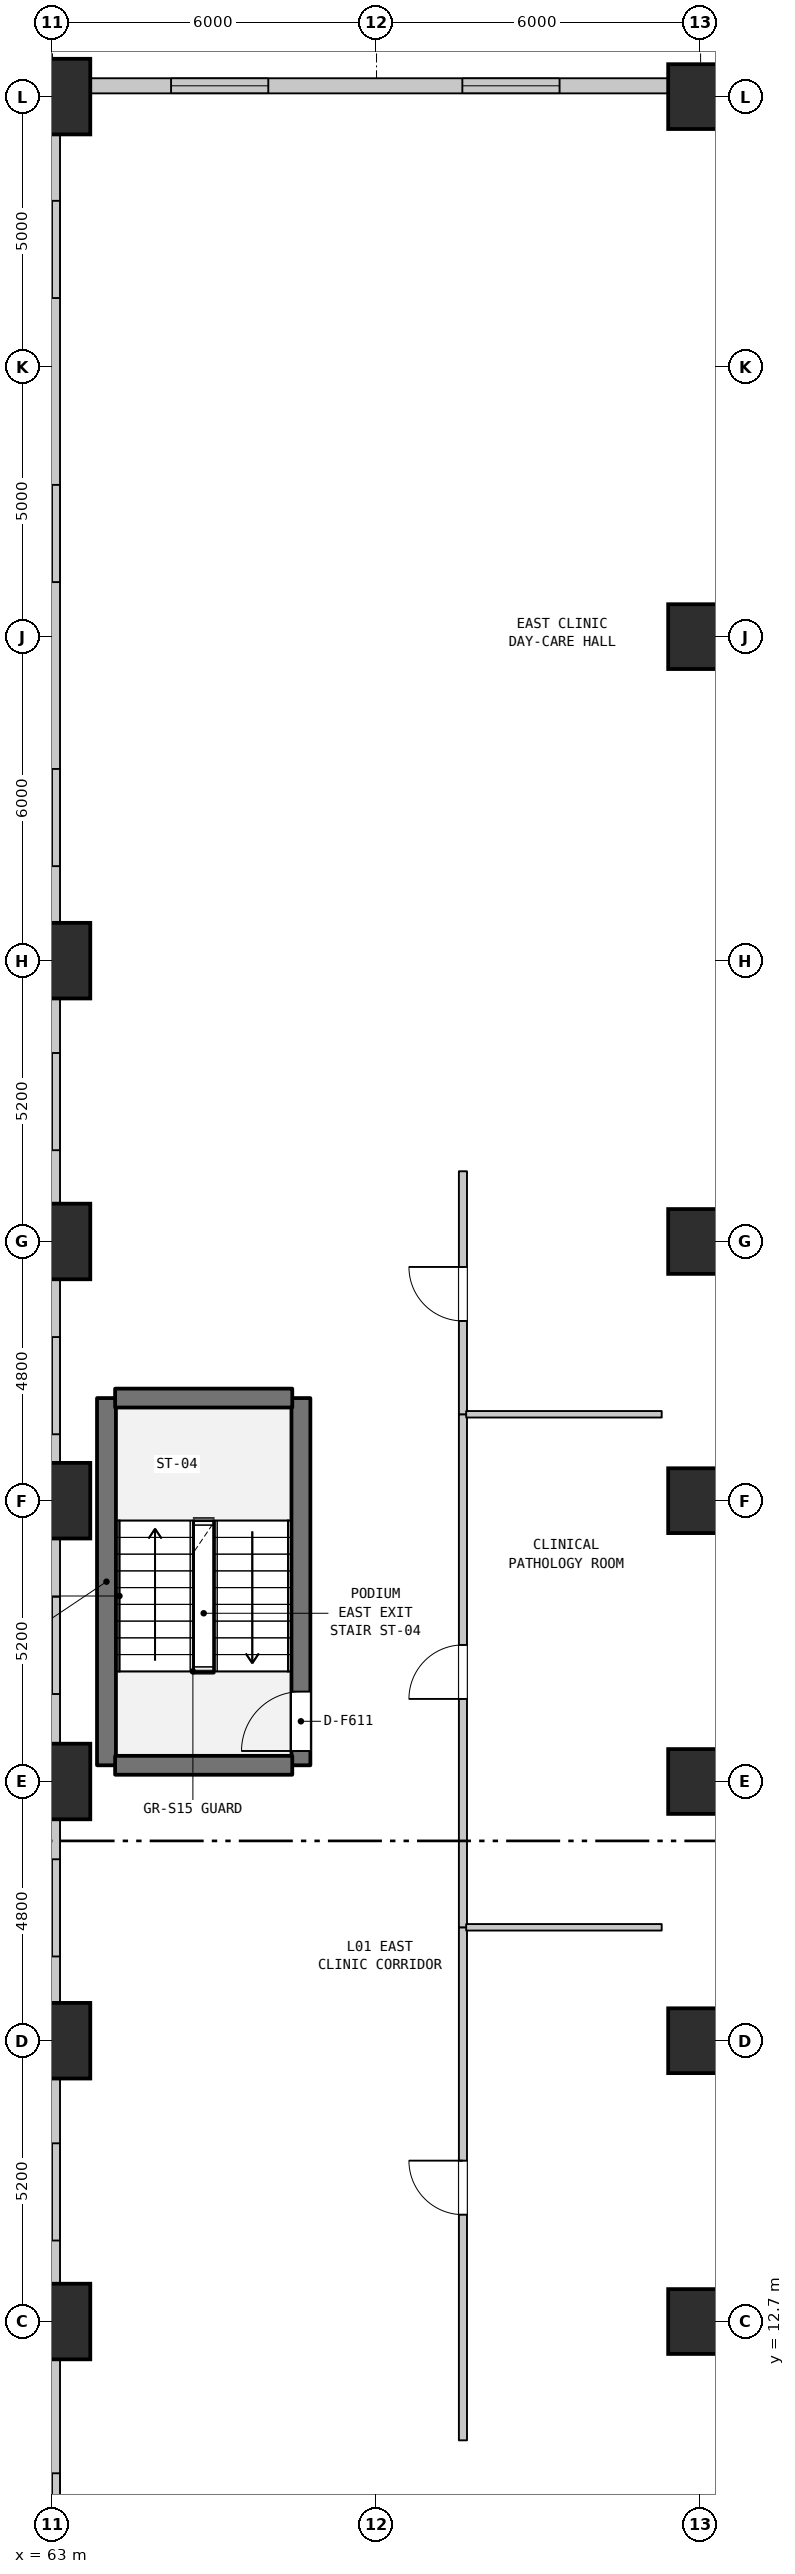
"""IFC4 building model, lengths in metres.
Left out: names, types, materials, properties, quantities, classifications, styles, units other than length and angle.
Written with IfcOpenShell. Run it as: python <this file> out.ifc"""

import sys

from ifc_helpers import new_model, si_unit, direction, frame, frame_2d, origin, origin_2d, place, context, subcontext, project, spatial, rectangle, extrude, element, fill, save


model = new_model("IFC4")
c1 = context("Model", 3, precision=1e-05, world=origin(), true_north=direction((0.0, 1.0)))
c2 = subcontext(c1, "Body", "Model", "MODEL_VIEW")
j1 = project(units=[si_unit("LENGTHUNIT", "METRE"), si_unit("PLANEANGLEUNIT", "RADIAN")], contexts=[c1])
p1 = place(None, origin())
s1 = spatial("IfcSite", under=j1, at=p1, CompositionType="ELEMENT")
p2 = place(p1, origin())
s2 = spatial("IfcBuilding", under=s1, at=p2, CompositionType="ELEMENT")
p3 = place(p2, frame((0.0, 0.0, 6.5)))
s3 = spatial("IfcBuildingStorey", under=s2, at=p3, CompositionType="ELEMENT", Elevation=6.5)
for number, where, z_axis, x_axis in (
    (1, (63.0, 12.7, 0.0), (0.0, 0.0, 1.0), (1.0, 0.0, 0.0)),
    (2, (63.0, 17.9, 0.0), (0.0, 0.0, 1.0), (1.0, 0.0, 0.0)),
    (3, (63.0, 22.7, 0.0), (0.0, 0.0, 1.0), (1.0, 0.0, 0.0)),
    (4, (63.0, 27.9, 0.0), (0.0, 0.0, 1.0), (1.0, 0.0, 0.0)),
    (5, (63.0, 32.7, 0.0), (0.0, 0.0, 1.0), (1.0, 0.0, 0.0)),
    (6, (63.0, 37.9, 0.0), (0.0, 0.0, 1.0), (1.0, 0.0, 0.0)),
    (7, (63.0, 53.9, 0.0), (0.0, 0.0, 1.0), (1.0, 0.0, 0.0)),
):
    element("IfcColumn", number, at=place(p3, frame(where, z_axis=z_axis, x_axis=x_axis)), inside=s3, PredefinedType="PILASTER", context=c2, shape_type="SweptSolid", body=[
        extrude(rectangle(XDim=1.4, YDim=1.4, at=origin_2d()), origin(), (0.0, 0.0, 1.0), 6.5),
    ])
for number, where, z_axis, x_axis in (
    (8, (75.0, 12.7, 0.0), (0.0, 0.0, 1.0), (1.0, 0.0, 0.0)),
    (9, (75.0, 17.9, 0.0), (0.0, 0.0, 1.0), (1.0, 0.0, 0.0)),
    (10, (75.0, 22.7, 0.0), (0.0, 0.0, 1.0), (1.0, 0.0, 0.0)),
    (11, (75.0, 27.9, 0.0), (0.0, 0.0, 1.0), (1.0, 0.0, 0.0)),
    (12, (75.0, 32.7, 0.0), (0.0, 0.0, 1.0), (1.0, 0.0, 0.0)),
    (13, (75.0, 43.9, 0.0), (0.0, 0.0, 1.0), (1.0, 0.0, 0.0)),
    (14, (75.0, 53.9, 0.0), (0.0, 0.0, 1.0), (1.0, 0.0, 0.0)),
):
    element("IfcColumn", number, at=place(p3, frame(where, z_axis=z_axis, x_axis=x_axis)), inside=s3, PredefinedType="PILASTER", context=c2, shape_type="SweptSolid", body=[
        extrude(rectangle(XDim=1.2, YDim=1.2, at=origin_2d()), origin(), (0.0, 0.0, 1.0), 6.5),
    ])
p4 = place(p3, frame((74.586, 54.1, 0.0), z_axis=(0.0, 0.0, 1.0), x_axis=(0.923717339373, -0.383074766777, 0.0)))
e15 = element("IfcWall", 15, at=p4, inside=s3, PredefinedType="STANDARD", context=c2, shape_type="SweptSolid", body=[
    extrude(rectangle(XDim=0.765, YDim=0.28, at=frame_2d((0.383, 0.0))), origin(), (0.0, 0.0, 1.0), 6.17),
])
p5 = place(p3, frame((75.293, 53.807, 0.0), z_axis=(0.0, 0.0, 1.0), x_axis=(0.707167825498, -0.707045731605, 0.0)))
e16 = element("IfcWall", 16, at=p5, inside=s3, PredefinedType="STANDARD", context=c2, shape_type="SweptSolid", body=[
    extrude(rectangle(XDim=2.0, YDim=0.28, at=frame_2d((1.0, 0.0))), origin(), (0.0, 0.0, 1.0), 6.17),
])
p6 = place(p3, frame((63.0, 0.7, 0.0), z_axis=(0.0, 0.0, 1.0), x_axis=(0.0, 1.0, 0.0)))
e17 = element("IfcWall", 17, at=p6, inside=s3, PredefinedType="STANDARD", context=c2, shape_type="SweptSolid", body=[
    extrude(rectangle(XDim=32.0, YDim=0.28, at=frame_2d((16.0, 0.0))), origin(), (0.0, 0.0, 1.0), 5.67),
])
p7 = place(p6, frame((2.13, 0.0, 0.95)))
e18 = element("IfcOpeningElement", 18, at=p7, cuts=e17, PredefinedType="OPENING", context=c2, shape_type="SweptSolid", body=[
    extrude(rectangle(XDim=1.8, YDim=1.8, at=frame_2d((0.9, 0.9))), frame((0.0, 0.15, 0.0), z_axis=(0.0, -1.0, 0.0), x_axis=(1.0, 0.0, 0.0)), (0.0, 0.0, 1.0), 0.3),
])
p8 = place(p6, frame((7.39, 0.0, 0.95)))
e19 = element("IfcOpeningElement", 19, at=p8, cuts=e17, PredefinedType="OPENING", context=c2, shape_type="SweptSolid", body=[
    extrude(rectangle(XDim=1.8, YDim=1.8, at=frame_2d((0.9, 0.9))), frame((0.0, 0.15, 0.0), z_axis=(0.0, -1.0, 0.0), x_axis=(1.0, 0.0, 0.0)), (0.0, 0.0, 1.0), 0.3),
])
p9 = place(p6, frame((13.5, 0.0, 0.95)))
e20 = element("IfcOpeningElement", 20, at=p9, cuts=e17, PredefinedType="OPENING", context=c2, shape_type="SweptSolid", body=[
    extrude(rectangle(XDim=1.8, YDim=1.8, at=frame_2d((0.9, 0.9))), frame((0.0, 0.15, 0.0), z_axis=(0.0, -1.0, 0.0), x_axis=(1.0, 0.0, 0.0)), (0.0, 0.0, 1.0), 0.3),
])
p10 = place(p6, frame((18.76, 0.0, 0.95)))
e21 = element("IfcOpeningElement", 21, at=p10, cuts=e17, PredefinedType="OPENING", context=c2, shape_type="SweptSolid", body=[
    extrude(rectangle(XDim=1.8, YDim=1.8, at=frame_2d((0.9, 0.9))), frame((0.0, 0.15, 0.0), z_axis=(0.0, -1.0, 0.0), x_axis=(1.0, 0.0, 0.0)), (0.0, 0.0, 1.0), 0.3),
])
p11 = place(p6, frame((23.62, 0.0, 0.95)))
e22 = element("IfcOpeningElement", 22, at=p11, cuts=e17, PredefinedType="OPENING", context=c2, shape_type="SweptSolid", body=[
    extrude(rectangle(XDim=1.8, YDim=1.8, at=frame_2d((0.9, 0.9))), frame((0.0, 0.15, 0.0), z_axis=(0.0, -1.0, 0.0), x_axis=(1.0, 0.0, 0.0)), (0.0, 0.0, 1.0), 0.3),
])
p12 = place(p6, frame((28.43, 0.0, 0.95)))
e23 = element("IfcOpeningElement", 23, at=p12, cuts=e17, PredefinedType="OPENING", context=c2, shape_type="SweptSolid", body=[
    extrude(rectangle(XDim=1.8, YDim=1.8, at=frame_2d((0.9, 0.9))), frame((0.0, 0.15, 0.0), z_axis=(0.0, -1.0, 0.0), x_axis=(1.0, 0.0, 0.0)), (0.0, 0.0, 1.0), 0.3),
])
p13 = place(p3, frame((63.0, 54.1, 0.0), z_axis=(0.0, 0.0, 1.0), x_axis=(1.0, 0.0, 0.0)))
e24 = element("IfcWall", 24, at=p13, inside=s3, PredefinedType="STANDARD", context=c2, shape_type="SweptSolid", body=[
    extrude(rectangle(XDim=11.586, YDim=0.28, at=frame_2d((5.793, 0.0))), origin(), (0.0, 0.0, 1.0), 6.17),
])
p14 = place(p13, frame((2.196, 0.0, 0.95)))
e25 = element("IfcOpeningElement", 25, at=p14, cuts=e24, PredefinedType="OPENING", context=c2, shape_type="SweptSolid", body=[
    extrude(rectangle(XDim=1.8, YDim=1.8, at=frame_2d((0.9, 0.9))), frame((0.0, 0.15, 0.0), z_axis=(0.0, -1.0, 0.0), x_axis=(1.0, 0.0, 0.0)), (0.0, 0.0, 1.0), 0.3),
])
p15 = place(p13, frame((7.589, 0.0, 0.95)))
e26 = element("IfcOpeningElement", 26, at=p15, cuts=e24, PredefinedType="OPENING", context=c2, shape_type="SweptSolid", body=[
    extrude(rectangle(XDim=1.8, YDim=1.8, at=frame_2d((0.9, 0.9))), frame((0.0, 0.15, 0.0), z_axis=(0.0, -1.0, 0.0), x_axis=(1.0, 0.0, 0.0)), (0.0, 0.0, 1.0), 0.3),
])
p16 = place(p3, frame((64.0, 23.0, 0.0), z_axis=(0.0, 0.0, 1.0), x_axis=(0.0, 1.0, 0.0)))
e27 = element("IfcWall", 27, at=p16, inside=s3, PredefinedType="SHEAR", context=c2, shape_type="SweptSolid", body=[
    extrude(rectangle(XDim=6.8, YDim=0.35, at=frame_2d((3.4, 0.0))), origin(), (0.0, 0.0, 1.0), 6.17),
])
p17 = place(p3, frame((67.6, 23.0, 0.0), z_axis=(0.0, 0.0, 1.0), x_axis=(0.0, 1.0, 0.0)))
e28 = element("IfcWall", 28, at=p17, inside=s3, PredefinedType="SHEAR", context=c2, shape_type="SweptSolid", body=[
    extrude(rectangle(XDim=6.8, YDim=0.35, at=frame_2d((3.4, 0.0))), origin(), (0.0, 0.0, 1.0), 6.17),
])
p18 = place(p17, frame((0.265, 0.0, 0.0)))
e29 = element("IfcOpeningElement", 29, at=p18, cuts=e28, PredefinedType="OPENING", context=c2, shape_type="SweptSolid", body=[
    extrude(rectangle(XDim=1.1, YDim=2.15, at=frame_2d((0.55, 1.075))), frame((0.0, 0.185, 0.0), z_axis=(0.0, -1.0, 0.0), x_axis=(1.0, 0.0, 0.0)), (0.0, 0.0, 1.0), 0.37),
])
p19 = place(p3, frame((70.6, 10.5, 0.0), z_axis=(0.0, 0.0, 1.0), x_axis=(0.0, 1.0, 0.0)))
e30 = element("IfcWall", 30, at=p19, inside=s3, PredefinedType="STANDARD", context=c2, shape_type="SweptSolid", body=[
    extrude(rectangle(XDim=9.5, YDim=0.15, at=frame_2d((4.75, 0.0))), origin(), (0.0, 0.0, 1.0), 6.17),
])
p20 = place(p19, frame((4.179, 0.0, 0.0)))
e31 = element("IfcOpeningElement", 31, at=p20, cuts=e30, PredefinedType="OPENING", context=c2, shape_type="SweptSolid", body=[
    extrude(rectangle(XDim=1.0, YDim=2.15, at=frame_2d((0.5, 1.075))), frame((0.0, 0.085, 0.0), z_axis=(0.0, -1.0, 0.0), x_axis=(1.0, 0.0, 0.0)), (0.0, 0.0, 1.0), 0.17),
])
p21 = place(p3, frame((70.6, 20.0, 0.0), z_axis=(0.0, 0.0, 1.0), x_axis=(0.0, 1.0, 0.0)))
e32 = element("IfcWall", 32, at=p21, inside=s3, PredefinedType="STANDARD", context=c2, shape_type="SweptSolid", body=[
    extrude(rectangle(XDim=9.5, YDim=0.15, at=frame_2d((4.75, 0.0))), origin(), (0.0, 0.0, 1.0), 6.17),
])
p22 = place(p21, frame((4.229, 0.0, 0.0)))
e33 = element("IfcOpeningElement", 33, at=p22, cuts=e32, PredefinedType="OPENING", context=c2, shape_type="SweptSolid", body=[
    extrude(rectangle(XDim=1.0, YDim=2.15, at=frame_2d((0.5, 1.075))), frame((0.0, 0.085, 0.0), z_axis=(0.0, -1.0, 0.0), x_axis=(1.0, 0.0, 0.0)), (0.0, 0.0, 1.0), 0.17),
])
p23 = place(p3, frame((70.6, 29.5, 0.0), z_axis=(0.0, 0.0, 1.0), x_axis=(0.0, 1.0, 0.0)))
e34 = element("IfcWall", 34, at=p23, inside=s3, PredefinedType="STANDARD", context=c2, shape_type="SweptSolid", body=[
    extrude(rectangle(XDim=4.5, YDim=0.15, at=frame_2d((2.25, 0.0))), origin(), (0.0, 0.0, 1.0), 6.17),
])
p24 = place(p23, frame((1.728, 0.0, 0.0)))
e35 = element("IfcOpeningElement", 35, at=p24, cuts=e34, PredefinedType="OPENING", context=c2, shape_type="SweptSolid", body=[
    extrude(rectangle(XDim=1.0, YDim=2.15, at=frame_2d((0.5, 1.075))), frame((0.0, 0.085, 0.0), z_axis=(0.0, -1.0, 0.0), x_axis=(1.0, 0.0, 0.0)), (0.0, 0.0, 1.0), 0.17),
])
p25 = place(p3, frame((70.66, 20.0, 0.0), z_axis=(0.0, 0.0, 1.0), x_axis=(1.0, 0.0, 0.0)))
e36 = element("IfcWall", 36, at=p25, inside=s3, PredefinedType="PARTITIONING", context=c2, shape_type="SweptSolid", body=[
    extrude(rectangle(XDim=3.62, YDim=0.12, at=frame_2d((1.81, 0.0))), origin(), (0.0, 0.0, 1.0), 6.17),
])
p26 = place(p3, frame((64.16, 23.0, 0.0), z_axis=(0.0, 0.0, 1.0), x_axis=(1.0, 0.0, 0.0)))
e37 = element("IfcWall", 37, at=p26, inside=s3, PredefinedType="SHEAR", context=c2, shape_type="SweptSolid", body=[
    extrude(rectangle(XDim=3.28, YDim=0.35, at=frame_2d((1.64, 0.0))), origin(), (0.0, 0.0, 1.0), 6.17),
])
p27 = place(p3, frame((70.66, 29.5, 0.0), z_axis=(0.0, 0.0, 1.0), x_axis=(1.0, 0.0, 0.0)))
e38 = element("IfcWall", 38, at=p27, inside=s3, PredefinedType="PARTITIONING", context=c2, shape_type="SweptSolid", body=[
    extrude(rectangle(XDim=3.62, YDim=0.12, at=frame_2d((1.81, 0.0))), origin(), (0.0, 0.0, 1.0), 6.17),
])
p28 = place(p3, frame((64.16, 29.8, 0.0), z_axis=(0.0, 0.0, 1.0), x_axis=(1.0, 0.0, 0.0)))
e39 = element("IfcWall", 39, at=p28, inside=s3, PredefinedType="SHEAR", context=c2, shape_type="SweptSolid", body=[
    extrude(rectangle(XDim=3.28, YDim=0.35, at=frame_2d((1.64, 0.0))), origin(), (0.0, 0.0, 1.0), 6.17),
])
p29 = place(p3, frame((63.0, 32.7, 0.0), z_axis=(0.0, 0.0, 1.0), x_axis=(0.0, 1.0, 0.0)))
e40 = element("IfcWall", 40, at=p29, inside=s3, PredefinedType="STANDARD", context=c2, shape_type="SweptSolid", body=[
    extrude(rectangle(XDim=21.4, YDim=0.28, at=frame_2d((10.7, 0.0))), origin(), (0.0, 0.0, 1.0), 5.57),
])
p30 = place(p29, frame((1.69, 0.0, 0.95)))
e41 = element("IfcOpeningElement", 41, at=p30, cuts=e40, PredefinedType="OPENING", context=c2, shape_type="SweptSolid", body=[
    extrude(rectangle(XDim=1.8, YDim=1.8, at=frame_2d((0.9, 0.9))), frame((0.0, 0.15, 0.0), z_axis=(0.0, -1.0, 0.0), x_axis=(1.0, 0.0, 0.0)), (0.0, 0.0, 1.0), 0.3),
])
p31 = place(p29, frame((6.95, 0.0, 0.95)))
e42 = element("IfcOpeningElement", 42, at=p31, cuts=e40, PredefinedType="OPENING", context=c2, shape_type="SweptSolid", body=[
    extrude(rectangle(XDim=1.8, YDim=1.8, at=frame_2d((0.9, 0.9))), frame((0.0, 0.15, 0.0), z_axis=(0.0, -1.0, 0.0), x_axis=(1.0, 0.0, 0.0)), (0.0, 0.0, 1.0), 0.3),
])
p32 = place(p29, frame((12.21, 0.0, 0.95)))
e43 = element("IfcOpeningElement", 43, at=p32, cuts=e40, PredefinedType="OPENING", context=c2, shape_type="SweptSolid", body=[
    extrude(rectangle(XDim=1.8, YDim=1.8, at=frame_2d((0.9, 0.9))), frame((0.0, 0.15, 0.0), z_axis=(0.0, -1.0, 0.0), x_axis=(1.0, 0.0, 0.0)), (0.0, 0.0, 1.0), 0.3),
])
p33 = place(p29, frame((17.47, 0.0, 0.95)))
e44 = element("IfcOpeningElement", 44, at=p33, cuts=e40, PredefinedType="OPENING", context=c2, shape_type="SweptSolid", body=[
    extrude(rectangle(XDim=1.8, YDim=1.8, at=frame_2d((0.9, 0.9))), frame((0.0, 0.15, 0.0), z_axis=(0.0, -1.0, 0.0), x_axis=(1.0, 0.0, 0.0)), (0.0, 0.0, 1.0), 0.3),
])
p34 = place(p8, origin())
e45 = element("IfcWindow", 45, at=p34, inside=s3, PartitioningType="DOUBLE_PANEL_VERTICAL", PredefinedType="WINDOW", context=c2, shape_type="SweptSolid", body=[
    extrude(rectangle(XDim=1.8, YDim=1.8, at=frame_2d((0.9, 0.9))), frame((0.0, 0.03, 0.0), z_axis=(0.0, -1.0, 0.0), x_axis=(1.0, 0.0, 0.0)), (0.0, 0.0, 1.0), 0.06),
])
fill(e19, e45)
p35 = place(p9, origin())
e46 = element("IfcWindow", 46, at=p35, inside=s3, PartitioningType="DOUBLE_PANEL_VERTICAL", PredefinedType="WINDOW", context=c2, shape_type="SweptSolid", body=[
    extrude(rectangle(XDim=1.8, YDim=1.8, at=frame_2d((0.9, 0.9))), frame((0.0, 0.03, 0.0), z_axis=(0.0, -1.0, 0.0), x_axis=(1.0, 0.0, 0.0)), (0.0, 0.0, 1.0), 0.06),
])
fill(e20, e46)
p36 = place(p10, origin())
e47 = element("IfcWindow", 47, at=p36, inside=s3, PartitioningType="DOUBLE_PANEL_VERTICAL", PredefinedType="WINDOW", context=c2, shape_type="SweptSolid", body=[
    extrude(rectangle(XDim=1.8, YDim=1.8, at=frame_2d((0.9, 0.9))), frame((0.0, 0.03, 0.0), z_axis=(0.0, -1.0, 0.0), x_axis=(1.0, 0.0, 0.0)), (0.0, 0.0, 1.0), 0.06),
])
fill(e21, e47)
p37 = place(p11, origin())
e48 = element("IfcWindow", 48, at=p37, inside=s3, PartitioningType="DOUBLE_PANEL_VERTICAL", PredefinedType="WINDOW", context=c2, shape_type="SweptSolid", body=[
    extrude(rectangle(XDim=1.8, YDim=1.8, at=frame_2d((0.9, 0.9))), frame((0.0, 0.03, 0.0), z_axis=(0.0, -1.0, 0.0), x_axis=(1.0, 0.0, 0.0)), (0.0, 0.0, 1.0), 0.06),
])
fill(e22, e48)
p38 = place(p12, origin())
e49 = element("IfcWindow", 49, at=p38, inside=s3, PartitioningType="DOUBLE_PANEL_VERTICAL", PredefinedType="WINDOW", context=c2, shape_type="SweptSolid", body=[
    extrude(rectangle(XDim=1.8, YDim=1.8, at=frame_2d((0.9, 0.9))), frame((0.0, 0.03, 0.0), z_axis=(0.0, -1.0, 0.0), x_axis=(1.0, 0.0, 0.0)), (0.0, 0.0, 1.0), 0.06),
])
fill(e23, e49)
p39 = place(p30, origin())
e50 = element("IfcWindow", 50, at=p39, inside=s3, PartitioningType="DOUBLE_PANEL_VERTICAL", PredefinedType="WINDOW", context=c2, shape_type="SweptSolid", body=[
    extrude(rectangle(XDim=1.8, YDim=1.8, at=frame_2d((0.9, 0.9))), frame((0.0, 0.03, 0.0), z_axis=(0.0, -1.0, 0.0), x_axis=(1.0, 0.0, 0.0)), (0.0, 0.0, 1.0), 0.06),
])
fill(e41, e50)
p40 = place(p31, origin())
e51 = element("IfcWindow", 51, at=p40, inside=s3, PartitioningType="DOUBLE_PANEL_VERTICAL", PredefinedType="WINDOW", context=c2, shape_type="SweptSolid", body=[
    extrude(rectangle(XDim=1.8, YDim=1.8, at=frame_2d((0.9, 0.9))), frame((0.0, 0.03, 0.0), z_axis=(0.0, -1.0, 0.0), x_axis=(1.0, 0.0, 0.0)), (0.0, 0.0, 1.0), 0.06),
])
fill(e42, e51)
p41 = place(p32, origin())
e52 = element("IfcWindow", 52, at=p41, inside=s3, PartitioningType="DOUBLE_PANEL_VERTICAL", PredefinedType="WINDOW", context=c2, shape_type="SweptSolid", body=[
    extrude(rectangle(XDim=1.8, YDim=1.8, at=frame_2d((0.9, 0.9))), frame((0.0, 0.03, 0.0), z_axis=(0.0, -1.0, 0.0), x_axis=(1.0, 0.0, 0.0)), (0.0, 0.0, 1.0), 0.06),
])
fill(e43, e52)
p42 = place(p33, origin())
e53 = element("IfcWindow", 53, at=p42, inside=s3, PartitioningType="DOUBLE_PANEL_VERTICAL", PredefinedType="WINDOW", context=c2, shape_type="SweptSolid", body=[
    extrude(rectangle(XDim=1.8, YDim=1.8, at=frame_2d((0.9, 0.9))), frame((0.0, 0.03, 0.0), z_axis=(0.0, -1.0, 0.0), x_axis=(1.0, 0.0, 0.0)), (0.0, 0.0, 1.0), 0.06),
])
fill(e44, e53)
p43 = place(p14, origin())
e54 = element("IfcWindow", 54, at=p43, inside=s3, PartitioningType="DOUBLE_PANEL_VERTICAL", PredefinedType="WINDOW", context=c2, shape_type="SweptSolid", body=[
    extrude(rectangle(XDim=1.8, YDim=1.8, at=frame_2d((0.9, 0.9))), frame((0.0, 0.03, 0.0), z_axis=(0.0, -1.0, 0.0), x_axis=(1.0, 0.0, 0.0)), (0.0, 0.0, 1.0), 0.06),
])
fill(e25, e54)
p44 = place(p15, origin())
e55 = element("IfcWindow", 55, at=p44, inside=s3, PartitioningType="DOUBLE_PANEL_VERTICAL", PredefinedType="WINDOW", context=c2, shape_type="SweptSolid", body=[
    extrude(rectangle(XDim=1.8, YDim=1.8, at=frame_2d((0.9, 0.9))), frame((0.0, 0.03, 0.0), z_axis=(0.0, -1.0, 0.0), x_axis=(1.0, 0.0, 0.0)), (0.0, 0.0, 1.0), 0.06),
])
fill(e26, e55)
p45 = place(p18, origin())
e56 = element("IfcDoor", 56, at=p45, inside=s3, OperationType="SINGLE_SWING_LEFT", PredefinedType="DOOR", context=c2, shape_type="SweptSolid", body=[
    extrude(rectangle(XDim=1.1, YDim=2.15, at=frame_2d((0.55, 1.075))), frame((0.0, 0.025, 0.0), z_axis=(0.0, -1.0, 0.0), x_axis=(1.0, 0.0, 0.0)), (0.0, 0.0, 1.0), 0.05),
])
fill(e29, e56)
p46 = place(p20, origin())
e57 = element("IfcDoor", 57, at=p46, inside=s3, OperationType="SINGLE_SWING_RIGHT", PredefinedType="DOOR", context=c2, shape_type="SweptSolid", body=[
    extrude(rectangle(XDim=1.0, YDim=2.15, at=frame_2d((0.5, 1.075))), frame((0.0, 0.025, 0.0), z_axis=(0.0, -1.0, 0.0), x_axis=(1.0, 0.0, 0.0)), (0.0, 0.0, 1.0), 0.05),
])
fill(e31, e57)
p47 = place(p22, origin())
e58 = element("IfcDoor", 58, at=p47, inside=s3, OperationType="SINGLE_SWING_LEFT", PredefinedType="DOOR", context=c2, shape_type="SweptSolid", body=[
    extrude(rectangle(XDim=1.0, YDim=2.15, at=frame_2d((0.5, 1.075))), frame((0.0, 0.025, 0.0), z_axis=(0.0, -1.0, 0.0), x_axis=(1.0, 0.0, 0.0)), (0.0, 0.0, 1.0), 0.05),
])
fill(e33, e58)
p48 = place(p24, origin())
e59 = element("IfcDoor", 59, at=p48, inside=s3, OperationType="SINGLE_SWING_RIGHT", PredefinedType="DOOR", context=c2, shape_type="SweptSolid", body=[
    extrude(rectangle(XDim=1.0, YDim=2.15, at=frame_2d((0.5, 1.075))), frame((0.0, 0.025, 0.0), z_axis=(0.0, -1.0, 0.0), x_axis=(1.0, 0.0, 0.0)), (0.0, 0.0, 1.0), 0.05),
])
fill(e35, e59)
save(model, sys.argv[1])
